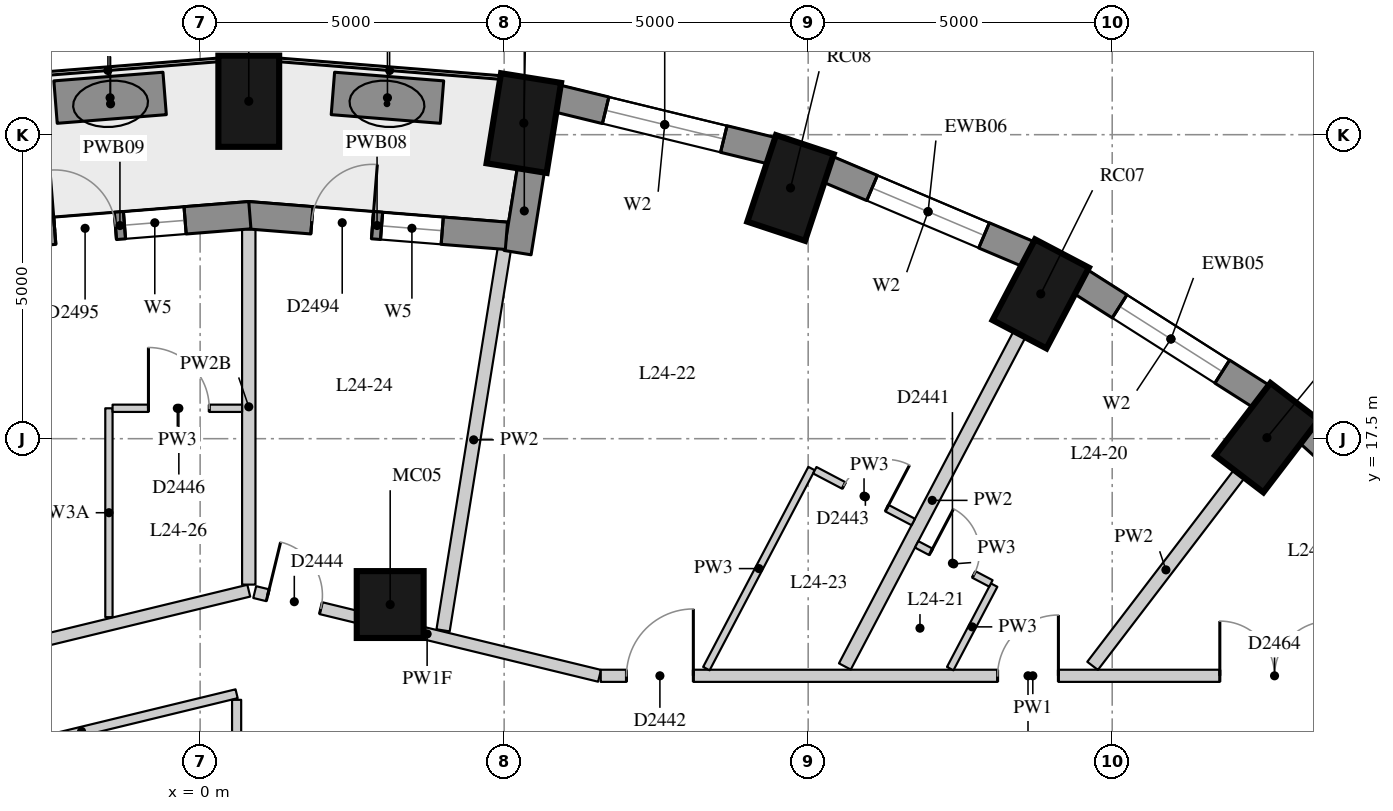
"""IFC4 building model, lengths in metres.
Left out: names, types, materials, properties, quantities, classifications, styles, units other than length and angle.
Written with IfcOpenShell. Run it as: python <this file> out.ifc"""

import sys

from ifc_helpers import new_model, si_unit, direction, frame, frame_2d, origin, origin_2d, place, context, subcontext, project, spatial, rectangle, extrude, element, fill, save


model = new_model("IFC4")
c1 = context("Model", 3, precision=1e-05, world=origin(), true_north=direction((0.0, 1.0)))
c2 = subcontext(c1, "Body", "Model", "MODEL_VIEW")
j1 = project(units=[si_unit("LENGTHUNIT", "METRE"), si_unit("PLANEANGLEUNIT", "RADIAN")], contexts=[c1])
p1 = place(None, origin())
s1 = spatial("IfcSite", under=j1, at=p1, CompositionType="ELEMENT")
p2 = place(p1, origin())
s2 = spatial("IfcBuilding", under=s1, at=p2, CompositionType="ELEMENT")
p3 = place(p2, frame((0.0, 0.0, 88.9)))
s3 = spatial("IfcBuildingStorey", under=s2, at=p3, CompositionType="ELEMENT", Elevation=88.9)
for number, where, z_axis, x_axis in (
    (1, (17.545, 17.517, 0.0), (0.0, 0.0, 1.0), (0.607, 0.795, 0.0)),
    (2, (13.825, 19.882, 0.0), (0.0, 0.0, 1.0), (0.465, 0.885, 0.0)),
    (3, (9.71, 21.624, 0.0), (0.0, 0.0, 1.0), (0.315, 0.949, 0.0)),
    (4, (5.323, 22.691, 0.0), (0.0, 0.0, 1.0), (0.159, 0.987, 0.0)),
    (5, (0.8, 23.05, 0.0), (0.0, 0.0, 1.0), (0.0, 1.0, 0.0)),
):
    element("IfcColumn", number, at=place(p3, frame(where, z_axis=z_axis, x_axis=x_axis)), inside=s3, PredefinedType="COLUMN", context=c2, shape_type="SweptSolid", body=[
        extrude(rectangle(XDim=1.5, YDim=1.0, at=origin_2d()), origin(), (0.0, 0.0, 1.0), 3.3),
    ])
p4 = place(p3, frame((3.126, 14.772, 0.0), z_axis=(0.0, 0.0, 1.0), x_axis=(1.0, 0.0, 0.0)))
e6 = element("IfcColumn", 6, at=p4, inside=s3, PredefinedType="COLUMN", context=c2, shape_type="SweptSolid", body=[
    extrude(rectangle(XDim=1.1, YDim=1.1, at=origin_2d()), origin(), (0.0, 0.0, 1.0), 3.3),
])
p5 = place(p3, frame((20.784, 15.281, 0.0), z_axis=(0.0, 0.0, 1.0), x_axis=(-0.74032902847, 0.672244694739, 0.0)))
e7 = element("IfcWall", 7, at=p5, inside=s3, PredefinedType="SOLIDWALL", context=c2, shape_type="SweptSolid", body=[
    extrude(rectangle(XDim=3.464, YDim=0.45, at=frame_2d((1.732, 0.0))), origin(), (0.0, 0.0, 1.0), 3.02),
])
p6 = place(p3, frame((17.456, 18.192, 0.0), z_axis=(0.0, 0.0, 1.0), x_axis=(-0.843880549131, 0.536531097699, 0.0)))
e8 = element("IfcWall", 8, at=p6, inside=s3, PredefinedType="SOLIDWALL", context=c2, shape_type="SweptSolid", body=[
    extrude(rectangle(XDim=3.532, YDim=0.45, at=frame_2d((1.766, 0.0))), origin(), (0.0, 0.0, 1.0), 3.02),
])
p7 = place(p6, frame((0.766, 0.0, 0.4)))
e9 = element("IfcOpeningElement", 9, at=p7, cuts=e8, PredefinedType="OPENING", context=c2, shape_type="SweptSolid", body=[
    extrude(rectangle(XDim=2.0, YDim=1.75, at=frame_2d((1.0, 0.875))), frame((0.0, 0.235, 0.0), z_axis=(0.0, -1.0, 0.0), x_axis=(1.0, 0.0, 0.0)), (0.0, 0.0, 1.0), 0.47),
])
p8 = place(p3, frame((13.625, 20.533, 0.0), z_axis=(0.0, 0.0, 1.0), x_axis=(-0.920869643542, 0.389870619055, 0.0)))
e10 = element("IfcWall", 10, at=p8, inside=s3, PredefinedType="SOLIDWALL", context=c2, shape_type="SweptSolid", body=[
    extrude(rectangle(XDim=3.591, YDim=0.45, at=frame_2d((1.796, 0.0))), origin(), (0.0, 0.0, 1.0), 3.02),
])
p9 = place(p8, frame((0.796, 0.0, 0.4)))
e11 = element("IfcOpeningElement", 11, at=p9, cuts=e10, PredefinedType="OPENING", context=c2, shape_type="SweptSolid", body=[
    extrude(rectangle(XDim=2.0, YDim=1.75, at=frame_2d((1.0, 0.875))), frame((0.0, 0.235, 0.0), z_axis=(0.0, -1.0, 0.0), x_axis=(1.0, 0.0, 0.0)), (0.0, 0.0, 1.0), 0.47),
])
p10 = place(p3, frame((9.406, 22.235, 0.0), z_axis=(0.0, 0.0, 1.0), x_axis=(-0.971667603162, 0.236351579148, 0.0)))
e12 = element("IfcWall", 12, at=p10, inside=s3, PredefinedType="SOLIDWALL", context=c2, shape_type="SweptSolid", body=[
    extrude(rectangle(XDim=3.635, YDim=0.45, at=frame_2d((1.817, 0.0))), origin(), (0.0, 0.0, 1.0), 3.02),
])
p11 = place(p10, frame((0.817, 0.0, 0.4)))
e13 = element("IfcOpeningElement", 13, at=p11, cuts=e12, PredefinedType="OPENING", context=c2, shape_type="SweptSolid", body=[
    extrude(rectangle(XDim=2.0, YDim=1.75, at=frame_2d((1.0, 0.875))), frame((0.0, 0.235, 0.0), z_axis=(0.0, -1.0, 0.0), x_axis=(1.0, 0.0, 0.0)), (0.0, 0.0, 1.0), 0.47),
])
p12 = place(p3, frame((5.441, 21.932, 0.0), z_axis=(0.0, 0.0, 1.0), x_axis=(-0.158586380547, -0.987345106792, 0.0)))
e14 = element("IfcWall", 14, at=p12, inside=s3, PredefinedType="SOLIDWALL", context=c2, shape_type="SweptSolid", body=[
    extrude(rectangle(XDim=1.39, YDim=0.45, at=frame_2d((0.695, 0.0))), origin(), (0.0, 0.0, 1.0), 3.02),
])
p13 = place(p3, frame((5.038, 20.837, 0.0), z_axis=(0.0, 0.0, 1.0), x_axis=(-0.996839780714, 0.079438350855, 0.0)))
e15 = element("IfcWall", 15, at=p13, inside=s3, PredefinedType="SOLIDWALL", context=c2, shape_type="SweptSolid", body=[
    extrude(rectangle(XDim=4.269, YDim=0.45, at=frame_2d((2.134, 0.0))), origin(), (0.0, 0.0, 1.0), 3.02),
])
p14 = place(p13, frame((1.06, 0.0, 0.4)))
e16 = element("IfcOpeningElement", 16, at=p14, cuts=e15, PredefinedType="OPENING", context=c2, shape_type="SweptSolid", body=[
    extrude(rectangle(XDim=1.0, YDim=1.75, at=frame_2d((0.5, 0.875))), frame((0.0, 0.235, 0.0), z_axis=(0.0, -1.0, 0.0), x_axis=(1.0, 0.0, 0.0)), (0.0, 0.0, 1.0), 0.47),
])
p15 = place(p13, frame((2.209, 0.0, 0.0)))
e17 = element("IfcOpeningElement", 17, at=p15, cuts=e15, PredefinedType="OPENING", context=c2, shape_type="SweptSolid", body=[
    extrude(rectangle(XDim=1.0, YDim=2.15, at=frame_2d((0.5, 1.075))), frame((0.0, 0.235, 0.0), z_axis=(0.0, -1.0, 0.0), x_axis=(1.0, 0.0, 0.0)), (0.0, 0.0, 1.0), 0.47),
])
p16 = place(p3, frame((0.818, 21.176, 0.0), z_axis=(0.0, 0.0, 1.0), x_axis=(-0.996843824935, -0.079387585235, 0.0)))
e18 = element("IfcWall", 18, at=p16, inside=s3, PredefinedType="SOLIDWALL", context=c2, shape_type="SweptSolid", body=[
    extrude(rectangle(XDim=4.287, YDim=0.45, at=frame_2d((2.144, 0.0))), origin(), (0.0, 0.0, 1.0), 3.02),
])
p17 = place(p16, frame((1.068, 0.0, 0.4)))
e19 = element("IfcOpeningElement", 19, at=p17, cuts=e18, PredefinedType="OPENING", context=c2, shape_type="SweptSolid", body=[
    extrude(rectangle(XDim=1.0, YDim=1.75, at=frame_2d((0.5, 0.875))), frame((0.0, 0.235, 0.0), z_axis=(0.0, -1.0, 0.0), x_axis=(1.0, 0.0, 0.0)), (0.0, 0.0, 1.0), 0.47),
])
p18 = place(p16, frame((2.219, 0.0, 0.0)))
e20 = element("IfcOpeningElement", 20, at=p18, cuts=e18, PredefinedType="OPENING", context=c2, shape_type="SweptSolid", body=[
    extrude(rectangle(XDim=1.0, YDim=2.15, at=frame_2d((0.5, 1.075))), frame((0.0, 0.235, 0.0), z_axis=(0.0, -1.0, 0.0), x_axis=(1.0, 0.0, 0.0)), (0.0, 0.0, 1.0), 0.47),
])
for number, where, z_axis, x_axis in (
    (21, (3.978, 23.036, 0.0), (0.0, 0.0, 1.0), (-0.997, 0.079, 0.0)),
    (22, (-0.583, 23.178, 0.0), (0.0, 0.0, 1.0), (-0.997, -0.079, 0.0)),
):
    element("IfcWall", number, at=place(p3, frame(where, z_axis=z_axis, x_axis=x_axis)), inside=s3, PredefinedType="USERDEFINED", context=c2, shape_type="SweptSolid", body=[
        extrude(rectangle(XDim=1.8, YDim=0.7, at=frame_2d((0.9, 0.0))), origin(), (0.0, 0.0, 1.0), 0.75),
    ])
p19 = place(p3, frame((-7.783, 12.916, 0.0), z_axis=(0.0, 0.0, 1.0), x_axis=(0.971770455305, 0.235928341232, 0.0)))
e23 = element("IfcWall", 23, at=p19, inside=s3, PredefinedType="PARTITIONING", context=c2, shape_type="SweptSolid", body=[
    extrude(rectangle(XDim=8.832, YDim=0.2, at=frame_2d((4.416, 0.0))), origin(), (0.0, 0.0, 1.0), 2.42),
])
p20 = place(p19, frame((2.84, 0.0, 0.0)))
e24 = element("IfcOpeningElement", 24, at=p20, cuts=e23, PredefinedType="OPENING", context=c2, shape_type="SweptSolid", body=[
    extrude(rectangle(XDim=1.1, YDim=2.1, at=frame_2d((0.55, 1.05))), frame((0.0, 0.11, 0.0), z_axis=(0.0, -1.0, 0.0), x_axis=(1.0, 0.0, 0.0)), (0.0, 0.0, 1.0), 0.22),
])
p21 = place(p19, frame((0.22, 0.0, 0.0)))
e25 = element("IfcOpeningElement", 25, at=p21, cuts=e23, PredefinedType="OPENING", context=c2, shape_type="SweptSolid", body=[
    extrude(rectangle(XDim=1.8, YDim=2.1, at=frame_2d((0.9, 1.05))), frame((0.0, 0.11, 0.0), z_axis=(0.0, -1.0, 0.0), x_axis=(1.0, 0.0, 0.0)), (0.0, 0.0, 1.0), 0.22),
])
p22 = place(p3, frame((0.898, 14.977, 0.0), z_axis=(0.0, 0.0, 1.0), x_axis=(0.971773711573, -0.235914928515, 0.0)))
e26 = element("IfcWall", 26, at=p22, inside=s3, PredefinedType="PARTITIONING", context=c2, shape_type="SweptSolid", body=[
    extrude(rectangle(XDim=5.836, YDim=0.2, at=frame_2d((2.918, 0.0))), origin(), (0.0, 0.0, 1.0), 2.42),
])
p23 = place(p22, frame((0.22, 0.0, 0.0)))
e27 = element("IfcOpeningElement", 27, at=p23, cuts=e26, PredefinedType="OPENING", context=c2, shape_type="SweptSolid", body=[
    extrude(rectangle(XDim=0.9, YDim=2.1, at=frame_2d((0.45, 1.05))), frame((0.0, 0.11, 0.0), z_axis=(0.0, -1.0, 0.0), x_axis=(1.0, 0.0, 0.0)), (0.0, 0.0, 1.0), 0.22),
])
p24 = place(p3, frame((6.589, 13.6, 0.0), z_axis=(0.0, 0.0, 1.0), x_axis=(1.0, 0.0, 0.0)))
e28 = element("IfcWall", 28, at=p24, inside=s3, PredefinedType="PARTITIONING", context=c2, shape_type="SweptSolid", body=[
    extrude(rectangle(XDim=14.211, YDim=0.2, at=frame_2d((7.106, 0.0))), origin(), (0.0, 0.0, 1.0), 3.02),
])
p25 = place(p24, frame((6.527, 0.0, 0.0)))
e29 = element("IfcOpeningElement", 29, at=p25, cuts=e28, PredefinedType="OPENING", context=c2, shape_type="SweptSolid", body=[
    extrude(rectangle(XDim=1.0, YDim=2.1, at=frame_2d((0.5, 1.05))), frame((0.0, 0.11, 0.0), z_axis=(0.0, -1.0, 0.0), x_axis=(1.0, 0.0, 0.0)), (0.0, 0.0, 1.0), 0.22),
])
p26 = place(p24, frame((0.423, 0.0, 0.0)))
e30 = element("IfcOpeningElement", 30, at=p26, cuts=e28, PredefinedType="OPENING", context=c2, shape_type="SweptSolid", body=[
    extrude(rectangle(XDim=1.1, YDim=2.1, at=frame_2d((0.55, 1.05))), frame((0.0, 0.11, 0.0), z_axis=(0.0, -1.0, 0.0), x_axis=(1.0, 0.0, 0.0)), (0.0, 0.0, 1.0), 0.22),
])
p27 = place(p24, frame((10.181, 0.0, 0.0)))
e31 = element("IfcOpeningElement", 31, at=p27, cuts=e28, PredefinedType="OPENING", context=c2, shape_type="SweptSolid", body=[
    extrude(rectangle(XDim=1.8, YDim=2.1, at=frame_2d((0.9, 1.05))), frame((0.0, 0.11, 0.0), z_axis=(0.0, -1.0, 0.0), x_axis=(1.0, 0.0, 0.0)), (0.0, 0.0, 1.0), 0.22),
])
p28 = place(p3, frame((-4.5, 12.067, 0.0), z_axis=(0.0, 0.0, 1.0), x_axis=(0.971799407652, 0.23580905684, 0.0)))
e32 = element("IfcWall", 32, at=p28, inside=s3, PredefinedType="PARTITIONING", context=c2, shape_type="SweptSolid", body=[
    extrude(rectangle(XDim=5.248, YDim=0.15, at=frame_2d((2.624, 0.0))), origin(), (0.0, 0.0, 1.0), 3.02),
])
p29 = place(p3, frame((0.6, 13.205, 0.0), z_axis=(0.0, 0.0, 1.0), x_axis=(0.0, -1.0, 0.0)))
e33 = element("IfcWall", 33, at=p29, inside=s3, PredefinedType="PARTITIONING", context=c2, shape_type="SweptSolid", body=[
    extrude(rectangle(XDim=4.055, YDim=0.15, at=frame_2d((2.027, 0.0))), origin(), (0.0, 0.0, 1.0), 3.02),
])
p30 = place(p3, frame((17.089, 16.921, 0.0), z_axis=(0.0, 0.0, 1.0), x_axis=(-0.607055443677, -0.794659479464, 0.0)))
e34 = element("IfcWall", 34, at=p30, inside=s3, PredefinedType="PARTITIONING", context=c2, shape_type="SweptSolid", body=[
    extrude(rectangle(XDim=3.973, YDim=0.22, at=frame_2d((1.987, 0.0))), origin(), (0.0, 0.0, 1.0), 3.02),
])
p31 = place(p3, frame((13.476, 19.218, 0.0), z_axis=(0.0, 0.0, 1.0), x_axis=(-0.465345394262, -0.885129179295, 0.0)))
e35 = element("IfcWall", 35, at=p31, inside=s3, PredefinedType="PARTITIONING", context=c2, shape_type="SweptSolid", body=[
    extrude(rectangle(XDim=6.173, YDim=0.22, at=frame_2d((3.086, 0.0))), origin(), (0.0, 0.0, 1.0), 3.02),
])
p32 = place(p3, frame((5.002, 20.614, 0.0), z_axis=(0.0, 0.0, 1.0), x_axis=(-0.158494605855, -0.987359843175, 0.0)))
e36 = element("IfcWall", 36, at=p32, inside=s3, PredefinedType="PARTITIONING", context=c2, shape_type="SweptSolid", body=[
    extrude(rectangle(XDim=6.346, YDim=0.22, at=frame_2d((3.173, 0.0))), origin(), (0.0, 0.0, 1.0), 3.02),
])
p33 = place(p3, frame((0.8, 20.948, 0.0), z_axis=(0.0, 0.0, 1.0), x_axis=(0.0, -1.0, 0.0)))
e37 = element("IfcWall", 37, at=p33, inside=s3, PredefinedType="PARTITIONING", context=c2, shape_type="SweptSolid", body=[
    extrude(rectangle(XDim=5.848, YDim=0.22, at=frame_2d((2.924, 0.0))), origin(), (0.0, 0.0, 1.0), 2.57),
])
p34 = place(p3, frame((12.336, 13.718, 0.0), z_axis=(0.0, 0.0, 1.0), x_axis=(0.465428746876, 0.88508535271, 0.0)))
e38 = element("IfcWall", 38, at=p34, inside=s3, PredefinedType="PARTITIONING", context=c2, shape_type="SweptSolid", body=[
    extrude(rectangle(XDim=1.552, YDim=0.12, at=frame_2d((0.776, 0.0))), origin(), (0.0, 0.0, 1.0), 3.02),
])
p35 = place(p3, frame((8.325, 13.718, 0.0), z_axis=(0.0, 0.0, 1.0), x_axis=(0.465348566369, 0.885127511593, 0.0)))
e39 = element("IfcWall", 39, at=p35, inside=s3, PredefinedType="PARTITIONING", context=c2, shape_type="SweptSolid", body=[
    extrude(rectangle(XDim=3.718, YDim=0.12, at=frame_2d((1.859, 0.0))), origin(), (0.0, 0.0, 1.0), 3.02),
])
p36 = place(p3, frame((-1.5, 14.565, 0.0), z_axis=(0.0, 0.0, 1.0), x_axis=(0.0, 1.0, 0.0)))
e40 = element("IfcWall", 40, at=p36, inside=s3, PredefinedType="PARTITIONING", context=c2, shape_type="SweptSolid", body=[
    extrude(rectangle(XDim=3.435, YDim=0.12, at=frame_2d((1.718, 0.0))), origin(), (0.0, 0.0, 1.0), 2.57),
])
p37 = place(p3, frame((13.005, 15.12, 0.0), z_axis=(0.0, 0.0, 1.0), x_axis=(-0.885148383454, 0.465308864378, 0.0)))
e41 = element("IfcWall", 41, at=p37, inside=s3, PredefinedType="PARTITIONING", context=c2, shape_type="SweptSolid", body=[
    extrude(rectangle(XDim=1.38, YDim=0.12, at=frame_2d((0.69, 0.0))), origin(), (0.0, 0.0, 1.0), 3.02),
])
p38 = place(p37, frame((0.315, 0.0, 0.0)))
e42 = element("IfcOpeningElement", 42, at=p38, cuts=e41, PredefinedType="OPENING", context=c2, shape_type="SweptSolid", body=[
    extrude(rectangle(XDim=0.8, YDim=2.1, at=frame_2d((0.4, 1.05))), frame((0.0, 0.07, 0.0), z_axis=(0.0, -1.0, 0.0), x_axis=(1.0, 0.0, 0.0)), (0.0, 0.0, 1.0), 0.14),
])
p39 = place(p3, frame((10.109, 16.981, 0.0), z_axis=(0.0, 0.0, 1.0), x_axis=(0.885114946598, -0.465372465139, 0.0)))
e43 = element("IfcWall", 43, at=p39, inside=s3, PredefinedType="PARTITIONING", context=c2, shape_type="SweptSolid", body=[
    extrude(rectangle(XDim=1.83, YDim=0.12, at=frame_2d((0.915, 0.0))), origin(), (0.0, 0.0, 1.0), 3.02),
])
p40 = place(p39, frame((0.54, 0.0, 0.0)))
e44 = element("IfcOpeningElement", 44, at=p40, cuts=e43, PredefinedType="OPENING", context=c2, shape_type="SweptSolid", body=[
    extrude(rectangle(XDim=0.8, YDim=2.1, at=frame_2d((0.4, 1.05))), frame((0.0, 0.07, 0.0), z_axis=(0.0, -1.0, 0.0), x_axis=(1.0, 0.0, 0.0)), (0.0, 0.0, 1.0), 0.14),
])
p41 = place(p3, frame((-1.44, 18.0, 0.0), z_axis=(0.0, 0.0, 1.0), x_axis=(1.0, 0.0, 0.0)))
e45 = element("IfcWall", 45, at=p41, inside=s3, PredefinedType="PARTITIONING", context=c2, shape_type="SweptSolid", body=[
    extrude(rectangle(XDim=2.13, YDim=0.12, at=frame_2d((1.065, 0.0))), origin(), (0.0, 0.0, 1.0), 3.02),
])
p42 = place(p41, frame((0.59, 0.0, 0.0)))
e46 = element("IfcOpeningElement", 46, at=p42, cuts=e45, PredefinedType="OPENING", context=c2, shape_type="SweptSolid", body=[
    extrude(rectangle(XDim=1.0, YDim=2.1, at=frame_2d((0.5, 1.05))), frame((0.0, 0.07, 0.0), z_axis=(0.0, -1.0, 0.0), x_axis=(1.0, 0.0, 0.0)), (0.0, 0.0, 1.0), 0.14),
])
p43 = place(p7, origin())
e47 = element("IfcWindow", 47, at=p43, inside=s3, PartitioningType="SINGLE_PANEL", PredefinedType="WINDOW", context=c2, shape_type="SweptSolid", body=[
    extrude(rectangle(XDim=2.0, YDim=1.75, at=frame_2d((1.0, 0.875))), frame((0.0, 0.035, 0.0), z_axis=(0.0, -1.0, 0.0), x_axis=(1.0, 0.0, 0.0)), (0.0, 0.0, 1.0), 0.06),
])
fill(e9, e47)
p44 = place(p9, origin())
e48 = element("IfcWindow", 48, at=p44, inside=s3, PartitioningType="SINGLE_PANEL", PredefinedType="WINDOW", context=c2, shape_type="SweptSolid", body=[
    extrude(rectangle(XDim=2.0, YDim=1.75, at=frame_2d((1.0, 0.875))), frame((0.0, 0.035, 0.0), z_axis=(0.0, -1.0, 0.0), x_axis=(1.0, 0.0, 0.0)), (0.0, 0.0, 1.0), 0.06),
])
fill(e11, e48)
p45 = place(p11, origin())
e49 = element("IfcWindow", 49, at=p45, inside=s3, PartitioningType="SINGLE_PANEL", PredefinedType="WINDOW", context=c2, shape_type="SweptSolid", body=[
    extrude(rectangle(XDim=2.0, YDim=1.75, at=frame_2d((1.0, 0.875))), frame((0.0, 0.035, 0.0), z_axis=(0.0, -1.0, 0.0), x_axis=(1.0, 0.0, 0.0)), (0.0, 0.0, 1.0), 0.06),
])
fill(e13, e49)
p46 = place(p14, origin())
e50 = element("IfcWindow", 50, at=p46, inside=s3, PartitioningType="SINGLE_PANEL", PredefinedType="WINDOW", context=c2, shape_type="SweptSolid", body=[
    extrude(rectangle(XDim=1.0, YDim=1.75, at=frame_2d((0.5, 0.875))), frame((0.0, 0.035, 0.0), z_axis=(0.0, -1.0, 0.0), x_axis=(1.0, 0.0, 0.0)), (0.0, 0.0, 1.0), 0.06),
])
fill(e16, e50)
p47 = place(p15, frame((1.0, 0.0, 0.0), z_axis=(0.0, 0.0, 1.0), x_axis=(-1.0, 0.0, 0.0)))
e51 = element("IfcDoor", 51, at=p47, inside=s3, OperationType="SINGLE_SWING_RIGHT", PredefinedType="DOOR", context=c2, shape_type="SweptSolid", body=[
    extrude(rectangle(XDim=1.0, YDim=2.15, at=frame_2d((0.5, 1.075))), frame((0.0, 0.075, 0.0), z_axis=(0.0, -1.0, 0.0), x_axis=(1.0, 0.0, 0.0)), (0.0, 0.0, 1.0), 0.05),
])
fill(e17, e51)
p48 = place(p17, origin())
e52 = element("IfcWindow", 52, at=p48, inside=s3, PartitioningType="SINGLE_PANEL", PredefinedType="WINDOW", context=c2, shape_type="SweptSolid", body=[
    extrude(rectangle(XDim=1.0, YDim=1.75, at=frame_2d((0.5, 0.875))), frame((0.0, 0.035, 0.0), z_axis=(0.0, -1.0, 0.0), x_axis=(1.0, 0.0, 0.0)), (0.0, 0.0, 1.0), 0.06),
])
fill(e19, e52)
p49 = place(p18, frame((1.0, 0.0, 0.0), z_axis=(0.0, 0.0, 1.0), x_axis=(-1.0, 0.0, 0.0)))
e53 = element("IfcDoor", 53, at=p49, inside=s3, OperationType="SINGLE_SWING_LEFT", PredefinedType="DOOR", context=c2, shape_type="SweptSolid", body=[
    extrude(rectangle(XDim=1.0, YDim=2.15, at=frame_2d((0.5, 1.075))), frame((0.0, 0.075, 0.0), z_axis=(0.0, -1.0, 0.0), x_axis=(1.0, 0.0, 0.0)), (0.0, 0.0, 1.0), 0.05),
])
fill(e20, e53)
p50 = place(p25, origin())
e54 = element("IfcDoor", 54, at=p50, inside=s3, OperationType="SINGLE_SWING_RIGHT", PredefinedType="DOOR", context=c2, shape_type="SweptSolid", body=[
    extrude(rectangle(XDim=1.0, YDim=2.1, at=frame_2d((0.5, 1.05))), frame((0.0, 0.025, 0.0), z_axis=(0.0, -1.0, 0.0), x_axis=(1.0, 0.0, 0.0)), (0.0, 0.0, 1.0), 0.05),
])
fill(e29, e54)
p51 = place(p38, origin())
e55 = element("IfcDoor", 55, at=p51, inside=s3, OperationType="SINGLE_SWING_LEFT", PredefinedType="DOOR", context=c2, shape_type="SweptSolid", body=[
    extrude(rectangle(XDim=0.8, YDim=2.1, at=frame_2d((0.4, 1.05))), frame((0.0, 0.025, 0.0), z_axis=(0.0, -1.0, 0.0), x_axis=(1.0, 0.0, 0.0)), (0.0, 0.0, 1.0), 0.05),
])
fill(e42, e55)
p52 = place(p26, origin())
e56 = element("IfcDoor", 56, at=p52, inside=s3, OperationType="SINGLE_SWING_RIGHT", PredefinedType="DOOR", context=c2, shape_type="SweptSolid", body=[
    extrude(rectangle(XDim=1.1, YDim=2.1, at=frame_2d((0.55, 1.05))), frame((0.0, 0.025, 0.0), z_axis=(0.0, -1.0, 0.0), x_axis=(1.0, 0.0, 0.0)), (0.0, 0.0, 1.0), 0.05),
])
fill(e30, e56)
p53 = place(p40, origin())
e57 = element("IfcDoor", 57, at=p53, inside=s3, OperationType="SINGLE_SWING_RIGHT", PredefinedType="DOOR", context=c2, shape_type="SweptSolid", body=[
    extrude(rectangle(XDim=0.8, YDim=2.1, at=frame_2d((0.4, 1.05))), frame((0.0, 0.025, 0.0), z_axis=(0.0, -1.0, 0.0), x_axis=(1.0, 0.0, 0.0)), (0.0, 0.0, 1.0), 0.05),
])
fill(e44, e57)
p54 = place(p23, origin())
e58 = element("IfcDoor", 58, at=p54, inside=s3, OperationType="SINGLE_SWING_LEFT", PredefinedType="DOOR", context=c2, shape_type="SweptSolid", body=[
    extrude(rectangle(XDim=0.9, YDim=2.1, at=frame_2d((0.45, 1.05))), frame((0.0, 0.025, 0.0), z_axis=(0.0, -1.0, 0.0), x_axis=(1.0, 0.0, 0.0)), (0.0, 0.0, 1.0), 0.05),
])
fill(e27, e58)
p55 = place(p42, origin())
e59 = element("IfcDoor", 59, at=p55, inside=s3, OperationType="SINGLE_SWING_LEFT", PredefinedType="DOOR", context=c2, shape_type="SweptSolid", body=[
    extrude(rectangle(XDim=1.0, YDim=2.1, at=frame_2d((0.5, 1.05))), frame((0.0, 0.025, 0.0), z_axis=(0.0, -1.0, 0.0), x_axis=(1.0, 0.0, 0.0)), (0.0, 0.0, 1.0), 0.05),
])
fill(e46, e59)
p56 = place(p27, origin())
e60 = element("IfcDoor", 60, at=p56, inside=s3, OperationType="DOUBLE_DOOR_SINGLE_SWING", PredefinedType="DOOR", context=c2, shape_type="SweptSolid", body=[
    extrude(rectangle(XDim=1.8, YDim=2.1, at=frame_2d((0.9, 1.05))), frame((0.0, 0.025, 0.0), z_axis=(0.0, -1.0, 0.0), x_axis=(1.0, 0.0, 0.0)), (0.0, 0.0, 1.0), 0.05),
])
fill(e31, e60)
save(model, sys.argv[1])
